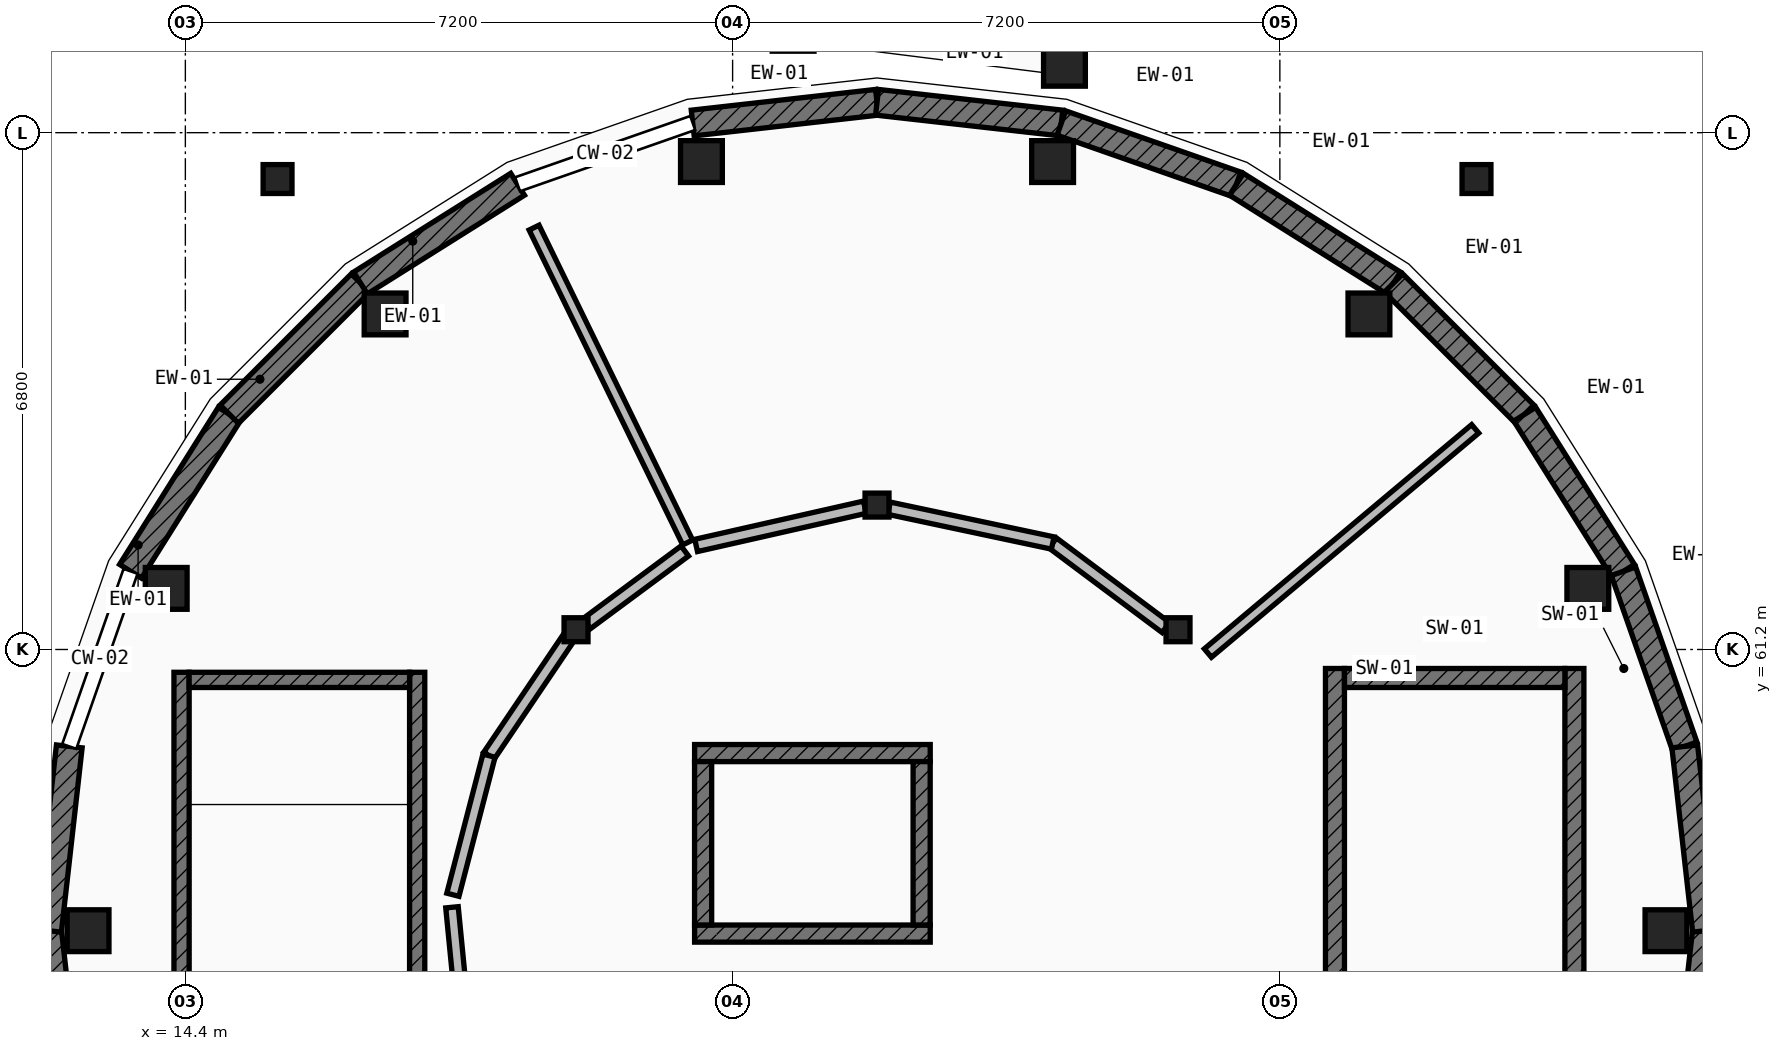
"""IFC4 building model, lengths in metres.
Left out: names, types, materials, properties, quantities, classifications, styles, units other than length and angle.
Written with IfcOpenShell. Run it as: python <this file> out.ifc"""

import sys

from ifc_helpers import new_model, si_unit, direction, frame, frame_2d, origin, origin_2d, place, context, subcontext, project, spatial, rectangle, circle, extrude, element, fill, save


model = new_model("IFC4")
c1 = context("Model", 3, precision=1e-05, world=origin(), true_north=direction((0.0, 1.0)))
c2 = subcontext(c1, "Body", "Model", "MODEL_VIEW")
j1 = project(units=[si_unit("LENGTHUNIT", "METRE"), si_unit("PLANEANGLEUNIT", "RADIAN")], contexts=[c1])
p1 = place(None, origin())
s1 = spatial("IfcSite", under=j1, at=p1, CompositionType="ELEMENT")
p2 = place(p1, origin())
s2 = spatial("IfcBuilding", under=s1, at=p2, CompositionType="ELEMENT")
p3 = place(p2, origin())
s3 = spatial("IfcBuildingStorey", under=s2, at=p3, CompositionType="ELEMENT", Elevation=0.0)
for number, where, z_axis, x_axis in (
    (1, (33.88, 57.5, 0.0), (0.0, 0.0, 1.0), (1.0, 0.0, 0.0)),
    (2, (32.852, 62.004, 0.0), (0.0, 0.0, 1.0), (1.0, 0.0, 0.0)),
    (3, (29.972, 65.615, 0.0), (0.0, 0.0, 1.0), (1.0, 0.0, 0.0)),
    (4, (25.81, 67.62, 0.0), (0.0, 0.0, 1.0), (1.0, 0.0, 0.0)),
    (5, (21.19, 67.62, 0.0), (0.0, 0.0, 1.0), (1.0, 0.0, 0.0)),
    (6, (17.028, 65.615, 0.0), (0.0, 0.0, 1.0), (1.0, 0.0, 0.0)),
    (7, (14.148, 62.004, 0.0), (0.0, 0.0, 1.0), (1.0, 0.0, 0.0)),
    (8, (13.12, 57.5, 0.0), (0.0, 0.0, 1.0), (1.0, 0.0, 0.0)),
):
    element("IfcColumn", number, at=place(p3, frame(where, z_axis=z_axis, x_axis=x_axis)), inside=s3, PredefinedType="PILASTER", context=c2, shape_type="SweptSolid", body=[
        extrude(circle(Radius=0.275, at=origin_2d()), origin(), (0.0, 0.0, 1.0), 4.55),
    ])
for number, where, z_axis, x_axis in (
    (9, (27.46, 61.46, 0.0), (0.0, 0.0, 1.0), (1.0, 0.0, 0.0)),
    (10, (23.5, 63.1, 0.0), (0.0, 0.0, 1.0), (1.0, 0.0, 0.0)),
    (11, (19.54, 61.46, 0.0), (0.0, 0.0, 1.0), (1.0, 0.0, 0.0)),
):
    element("IfcColumn", number, at=place(p3, frame(where, z_axis=z_axis, x_axis=x_axis)), inside=s3, PredefinedType="COLUMN", context=c2, shape_type="SweptSolid", body=[
        extrude(rectangle(XDim=0.315, YDim=0.315, at=origin_2d()), origin(), (0.0, 0.0, 1.0), 4.55),
    ])
p4 = place(p3, frame((25.966, 68.887, 0.0), z_axis=(0.0, 0.0, 1.0), x_axis=(1.0, 0.0, 0.0)))
e12 = element("IfcColumn", 12, at=p4, inside=s3, PredefinedType="PILASTER", context=c2, shape_type="SweptSolid", body=[
    extrude(circle(Radius=0.275, at=origin_2d()), origin(), (0.0, 0.0, 1.0), 4.55),
])
for number, where, z_axis, x_axis in (
    (13, (31.387, 67.39, 1.15), (0.0, 0.0, 1.0), (1.0, 0.0, 0.0)),
    (14, (15.613, 67.39, 1.15), (0.0, 0.0, 1.0), (1.0, 0.0, 0.0)),
):
    element("IfcColumn", number, at=place(p3, frame(where, z_axis=z_axis, x_axis=x_axis)), inside=s3, PredefinedType="PILASTER", context=c2, shape_type="SweptSolid", body=[
        extrude(circle(Radius=0.19, at=origin_2d()), origin(), (0.0, 0.0, 1.0), 3.4),
    ])
for number, where, z_axis, x_axis in (
    (15, (34.4, 57.5, 0.0), (0.0, 0.0, 1.0), (-0.112, -0.994, 0.0)),
    (16, (12.873, 55.075, 0.0), (0.0, 0.0, 1.0), (-0.112, 0.994, 0.0)),
    (17, (12.6, 57.5, 0.0), (0.0, 0.0, 1.0), (0.112, 0.994, 0.0)),
):
    element("IfcWall", number, at=place(p3, frame(where, z_axis=z_axis, x_axis=x_axis)), inside=s3, PredefinedType="SOLIDWALL", context=c2, shape_type="SweptSolid", body=[
        extrude(rectangle(XDim=2.44, YDim=0.34, at=frame_2d((1.22, 0.0))), origin(), (0.0, 0.0, 1.0), 3.659),
    ])
p5 = place(p3, frame((13.679, 62.229, 0.0), z_axis=(0.0, 0.0, 1.0), x_axis=(0.532136726684, 0.846658434148, 0.0)))
e18 = element("IfcWall", 18, at=p5, inside=s3, PredefinedType="SOLIDWALL", context=c2, shape_type="SweptSolid", body=[
    extrude(rectangle(XDim=2.441, YDim=0.34, at=frame_2d((1.221, 0.0))), origin(), (0.0, 0.0, 1.0), 3.659),
])
p6 = place(p5, frame((0.521, 0.0, 0.0)))
e19 = element("IfcOpeningElement", 19, at=p6, cuts=e18, PredefinedType="OPENING", context=c2, shape_type="SweptSolid", body=[
    extrude(rectangle(XDim=1.4, YDim=2.3, at=frame_2d((0.7, 1.15))), frame((0.0, 0.18, 0.0), z_axis=(0.0, -1.0, 0.0), x_axis=(1.0, 0.0, 0.0)), (0.0, 0.0, 1.0), 0.36),
])
p7 = place(p3, frame((14.978, 64.296, 0.0), z_axis=(0.0, 0.0, 1.0), x_axis=(0.707106781187, 0.707106781187, 0.0)))
e20 = element("IfcWall", 20, at=p7, inside=s3, PredefinedType="SOLIDWALL", context=c2, shape_type="SweptSolid", body=[
    extrude(rectangle(XDim=2.441, YDim=0.34, at=frame_2d((1.22, 0.0))), origin(), (0.0, 0.0, 1.0), 3.659),
])
p8 = place(p3, frame((16.704, 66.022, 0.0), z_axis=(0.0, 0.0, 1.0), x_axis=(0.846658434148, 0.532136726684, 0.0)))
e21 = element("IfcWall", 21, at=p8, inside=s3, PredefinedType="SOLIDWALL", context=c2, shape_type="SweptSolid", body=[
    extrude(rectangle(XDim=2.441, YDim=0.34, at=frame_2d((1.221, 0.0))), origin(), (0.0, 0.0, 1.0), 3.659),
])
for number, where, z_axis, x_axis in (
    (22, (21.075, 68.127, 0.0), (0.0, 0.0, 1.0), (0.994, 0.112, 0.0)),
    (23, (23.5, 68.4, 0.0), (0.0, 0.0, 1.0), (0.994, -0.112, 0.0)),
):
    element("IfcWall", number, at=place(p3, frame(where, z_axis=z_axis, x_axis=x_axis)), inside=s3, PredefinedType="SOLIDWALL", context=c2, shape_type="SweptSolid", body=[
        extrude(rectangle(XDim=2.44, YDim=0.34, at=frame_2d((1.22, 0.0))), origin(), (0.0, 0.0, 1.0), 3.659),
    ])
p9 = place(p3, frame((25.925, 68.127, 0.0), z_axis=(0.0, 0.0, 1.0), x_axis=(0.943919156274, -0.330176659411, 0.0)))
e24 = element("IfcWall", 24, at=p9, inside=s3, PredefinedType="SOLIDWALL", context=c2, shape_type="SweptSolid", body=[
    extrude(rectangle(XDim=2.441, YDim=0.34, at=frame_2d((1.22, 0.0))), origin(), (0.0, 0.0, 1.0), 3.659),
])
p10 = place(p3, frame((28.229, 67.321, 0.0), z_axis=(0.0, 0.0, 1.0), x_axis=(0.846658434148, -0.532136726684, 0.0)))
e25 = element("IfcWall", 25, at=p10, inside=s3, PredefinedType="SOLIDWALL", context=c2, shape_type="SweptSolid", body=[
    extrude(rectangle(XDim=2.441, YDim=0.34, at=frame_2d((1.221, 0.0))), origin(), (0.0, 0.0, 1.0), 3.659),
])
p11 = place(p10, frame((0.571, 0.0, 0.0)))
e26 = element("IfcOpeningElement", 26, at=p11, cuts=e25, PredefinedType="OPENING", context=c2, shape_type="SweptSolid", body=[
    extrude(rectangle(XDim=1.3, YDim=2.25, at=frame_2d((0.65, 1.125))), frame((0.0, 0.18, 0.0), z_axis=(0.0, -1.0, 0.0), x_axis=(1.0, 0.0, 0.0)), (0.0, 0.0, 1.0), 0.36),
])
p12 = place(p3, frame((30.296, 66.022, 0.0), z_axis=(0.0, 0.0, 1.0), x_axis=(0.707106781187, -0.707106781187, 0.0)))
e27 = element("IfcWall", 27, at=p12, inside=s3, PredefinedType="SOLIDWALL", context=c2, shape_type="SweptSolid", body=[
    extrude(rectangle(XDim=2.441, YDim=0.34, at=frame_2d((1.22, 0.0))), origin(), (0.0, 0.0, 1.0), 3.659),
])
p13 = place(p3, frame((32.022, 64.296, 0.0), z_axis=(0.0, 0.0, 1.0), x_axis=(0.532136726684, -0.846658434148, 0.0)))
e28 = element("IfcWall", 28, at=p13, inside=s3, PredefinedType="SOLIDWALL", context=c2, shape_type="SweptSolid", body=[
    extrude(rectangle(XDim=2.441, YDim=0.34, at=frame_2d((1.221, 0.0))), origin(), (0.0, 0.0, 1.0), 3.659),
])
p14 = place(p3, frame((33.321, 62.229, 0.0), z_axis=(0.0, 0.0, 1.0), x_axis=(0.330176659411, -0.943919156274, 0.0)))
e29 = element("IfcWall", 29, at=p14, inside=s3, PredefinedType="SOLIDWALL", context=c2, shape_type="SweptSolid", body=[
    extrude(rectangle(XDim=2.441, YDim=0.34, at=frame_2d((1.22, 0.0))), origin(), (0.0, 0.0, 1.0), 3.659),
])
p15 = place(p3, frame((34.127, 59.925, 0.0), z_axis=(0.0, 0.0, 1.0), x_axis=(0.111847873866, -0.993725340882, 0.0)))
e30 = element("IfcWall", 30, at=p15, inside=s3, PredefinedType="SOLIDWALL", context=c2, shape_type="SweptSolid", body=[
    extrude(rectangle(XDim=2.44, YDim=0.34, at=frame_2d((1.22, 0.0))), origin(), (0.0, 0.0, 1.0), 3.659),
])
p16 = place(p3, frame((29.525, 60.95, 0.0), z_axis=(0.0, 0.0, 1.0), x_axis=(0.0, -1.0, 0.0)))
e31 = element("IfcWall", 31, at=p16, inside=s3, PredefinedType="SHEAR", context=c2, shape_type="SweptSolid", body=[
    extrude(rectangle(XDim=6.9, YDim=0.25, at=frame_2d((3.45, 0.0))), origin(), (0.0, 0.0, 1.0), 4.305),
])
p17 = place(p16, frame((0.43, 0.0, 0.0)))
e32 = element("IfcOpeningElement", 32, at=p17, cuts=e31, PredefinedType="OPENING", context=c2, shape_type="SweptSolid", body=[
    extrude(rectangle(XDim=1.1, YDim=2.15, at=frame_2d((0.55, 1.075))), frame((0.0, 0.135, 0.0), z_axis=(0.0, -1.0, 0.0), x_axis=(1.0, 0.0, 0.0)), (0.0, 0.0, 1.0), 0.27),
])
p18 = place(p3, frame((32.675, 60.95, 0.0), z_axis=(0.0, 0.0, 1.0), x_axis=(0.0, -1.0, 0.0)))
e33 = element("IfcWall", 33, at=p18, inside=s3, PredefinedType="SHEAR", context=c2, shape_type="SweptSolid", body=[
    extrude(rectangle(XDim=6.9, YDim=0.25, at=frame_2d((3.45, 0.0))), origin(), (0.0, 0.0, 1.0), 4.305),
])
p19 = place(p3, frame((29.65, 60.825, 0.0), z_axis=(0.0, 0.0, 1.0), x_axis=(1.0, 0.0, 0.0)))
e34 = element("IfcWall", 34, at=p19, inside=s3, PredefinedType="SHEAR", context=c2, shape_type="SweptSolid", body=[
    extrude(rectangle(XDim=2.9, YDim=0.25, at=frame_2d((1.45, 0.0))), origin(), (0.0, 0.0, 1.0), 4.305),
])
p20 = place(p3, frame((17.45, 54.1, 0.0), z_axis=(0.0, 0.0, 1.0), x_axis=(0.0, 1.0, 0.0)))
e35 = element("IfcWall", 35, at=p20, inside=s3, PredefinedType="SHEAR", context=c2, shape_type="SweptSolid", body=[
    extrude(rectangle(XDim=6.8, YDim=0.2, at=frame_2d((3.4, 0.0))), origin(), (0.0, 0.0, 1.0), 4.305),
])
p21 = place(p20, frame((0.38, 0.0, 0.0)))
e36 = element("IfcOpeningElement", 36, at=p21, cuts=e35, PredefinedType="OPENING", context=c2, shape_type="SweptSolid", body=[
    extrude(rectangle(XDim=1.05, YDim=2.15, at=frame_2d((0.525, 1.075))), frame((0.0, 0.11, 0.0), z_axis=(0.0, -1.0, 0.0), x_axis=(1.0, 0.0, 0.0)), (0.0, 0.0, 1.0), 0.22),
])
p22 = place(p3, frame((14.35, 54.1, 0.0), z_axis=(0.0, 0.0, 1.0), x_axis=(0.0, 1.0, 0.0)))
e37 = element("IfcWall", 37, at=p22, inside=s3, PredefinedType="SHEAR", context=c2, shape_type="SweptSolid", body=[
    extrude(rectangle(XDim=6.8, YDim=0.2, at=frame_2d((3.4, 0.0))), origin(), (0.0, 0.0, 1.0), 4.305),
])
p23 = place(p3, frame((17.35, 60.8, 0.0), z_axis=(0.0, 0.0, 1.0), x_axis=(-1.0, 0.0, 0.0)))
e38 = element("IfcWall", 38, at=p23, inside=s3, PredefinedType="SHEAR", context=c2, shape_type="SweptSolid", body=[
    extrude(rectangle(XDim=2.9, YDim=0.2, at=frame_2d((1.45, 0.0))), origin(), (0.0, 0.0, 1.0), 4.305),
])
p24 = place(p3, frame((21.1, 57.462, 0.0), z_axis=(0.0, 0.0, 1.0), x_axis=(1.0, 0.0, 0.0)))
e39 = element("IfcWall", 39, at=p24, inside=s3, PredefinedType="SHEAR", context=c2, shape_type="SweptSolid", body=[
    extrude(rectangle(XDim=3.1, YDim=0.225, at=frame_2d((1.55, 0.0))), origin(), (0.0, 0.0, 1.0), 4.305),
])
p25 = place(p24, frame((0.95, 0.0, 0.0)))
e40 = element("IfcOpeningElement", 40, at=p25, cuts=e39, PredefinedType="OPENING", context=c2, shape_type="SweptSolid", body=[
    extrude(rectangle(XDim=1.2, YDim=2.2, at=frame_2d((0.6, 1.1))), frame((0.0, 0.123, 0.0), z_axis=(0.0, -1.0, 0.0), x_axis=(1.0, 0.0, 0.0)), (0.0, 0.0, 1.0), 0.245),
])
p26 = place(p3, frame((21.1, 59.837, 0.0), z_axis=(0.0, 0.0, 1.0), x_axis=(1.0, 0.0, 0.0)))
e41 = element("IfcWall", 41, at=p26, inside=s3, PredefinedType="SHEAR", context=c2, shape_type="SweptSolid", body=[
    extrude(rectangle(XDim=3.1, YDim=0.225, at=frame_2d((1.55, 0.0))), origin(), (0.0, 0.0, 1.0), 4.305),
])
for number, where, z_axis, x_axis in (
    (42, (21.212, 57.575, 0.0), (0.0, 0.0, 1.0), (0.0, 1.0, 0.0)),
    (43, (24.087, 57.575, 0.0), (0.0, 0.0, 1.0), (0.0, 1.0, 0.0)),
):
    element("IfcWall", number, at=place(p3, frame(where, z_axis=z_axis, x_axis=x_axis)), inside=s3, PredefinedType="SHEAR", context=c2, shape_type="SweptSolid", body=[
        extrude(rectangle(XDim=2.15, YDim=0.225, at=frame_2d((1.075, 0.0))), origin(), (0.0, 0.0, 1.0), 4.305),
    ])
p27 = place(p3, frame((27.853, 61.153, 0.0), z_axis=(0.0, 0.0, 1.0), x_axis=(0.766177182771, 0.64262938355, 0.0)))
e44 = element("IfcWall", 44, at=p27, inside=s3, PredefinedType="PARTITIONING", context=c2, shape_type="SweptSolid", body=[
    extrude(rectangle(XDim=4.59, YDim=0.145, at=frame_2d((2.295, 0.0))), origin(), (0.0, 0.0, 1.0), 3.634),
])
p28 = place(p3, frame((21.009, 62.608, 0.0), z_axis=(0.0, 0.0, 1.0), x_axis=(-0.438421545089, 0.898769463657, 0.0)))
e45 = element("IfcWall", 45, at=p28, inside=s3, PredefinedType="PARTITIONING", context=c2, shape_type="SweptSolid", body=[
    extrude(rectangle(XDim=4.61, YDim=0.145, at=frame_2d((2.305, 0.0))), origin(), (0.0, 0.0, 1.0), 3.634),
])
p29 = place(p3, frame((27.3, 61.489, 0.0), z_axis=(0.0, 0.0, 1.0), x_axis=(-0.801023932766, 0.598632323831, 0.0)))
e46 = element("IfcWall", 46, at=p29, inside=s3, PredefinedType="PARTITIONING", context=c2, shape_type="SweptSolid", body=[
    extrude(rectangle(XDim=1.858, YDim=0.165, at=frame_2d((0.929, 0.0))), origin(), (0.0, 0.0, 1.0), 3.634),
])
p30 = place(p29, frame((0.289, 0.0, 0.0)))
e47 = element("IfcOpeningElement", 47, at=p30, cuts=e46, PredefinedType="OPENING", context=c2, shape_type="SweptSolid", body=[
    extrude(rectangle(XDim=1.28, YDim=2.3, at=frame_2d((0.64, 1.15))), frame((0.0, 0.093, 0.0), z_axis=(0.0, -1.0, 0.0), x_axis=(1.0, 0.0, 0.0)), (0.0, 0.0, 1.0), 0.185),
])
p31 = place(p3, frame((25.812, 62.601, 0.0), z_axis=(0.0, 0.0, 1.0), x_axis=(-0.978152936259, 0.207886587563, 0.0)))
e48 = element("IfcWall", 48, at=p31, inside=s3, PredefinedType="PARTITIONING", context=c2, shape_type="SweptSolid", body=[
    extrude(rectangle(XDim=2.203, YDim=0.165, at=frame_2d((1.102, 0.0))), origin(), (0.0, 0.0, 1.0), 3.634),
])
p32 = place(p3, frame((23.34, 63.072, 0.0), z_axis=(0.0, 0.0, 1.0), x_axis=(-0.975285396453, -0.2209488526, 0.0)))
e49 = element("IfcWall", 49, at=p32, inside=s3, PredefinedType="PARTITIONING", context=c2, shape_type="SweptSolid", body=[
    extrude(rectangle(XDim=2.276, YDim=0.165, at=frame_2d((1.138, 0.0))), origin(), (0.0, 0.0, 1.0), 3.634),
])
p33 = place(p3, frame((20.971, 62.496, 0.0), z_axis=(0.0, 0.0, 1.0), x_axis=(-0.803417109956, -0.59541661669, 0.0)))
e50 = element("IfcWall", 50, at=p33, inside=s3, PredefinedType="PARTITIONING", context=c2, shape_type="SweptSolid", body=[
    extrude(rectangle(XDim=1.606, YDim=0.165, at=frame_2d((0.803, 0.0))), origin(), (0.0, 0.0, 1.0), 3.634),
])
p34 = place(p33, frame((0.353, 0.0, 0.0)))
e51 = element("IfcOpeningElement", 51, at=p34, cuts=e50, PredefinedType="OPENING", context=c2, shape_type="SweptSolid", body=[
    extrude(rectangle(XDim=0.9, YDim=2.1, at=frame_2d((0.45, 1.05))), frame((0.0, 0.093, 0.0), z_axis=(0.0, -1.0, 0.0), x_axis=(1.0, 0.0, 0.0)), (0.0, 0.0, 1.0), 0.185),
])
p35 = place(p3, frame((19.432, 61.339, 0.0), z_axis=(0.0, 0.0, 1.0), x_axis=(-0.559463805142, -0.828854782659, 0.0)))
e52 = element("IfcWall", 52, at=p35, inside=s3, PredefinedType="PARTITIONING", context=c2, shape_type="SweptSolid", body=[
    extrude(rectangle(XDim=1.853, YDim=0.165, at=frame_2d((0.927, 0.0))), origin(), (0.0, 0.0, 1.0), 3.634),
])
p36 = place(p3, frame((18.395, 59.803, 0.0), z_axis=(0.0, 0.0, 1.0), x_axis=(-0.251275827958, -0.967915522287, 0.0)))
e53 = element("IfcWall", 53, at=p36, inside=s3, PredefinedType="PARTITIONING", context=c2, shape_type="SweptSolid", body=[
    extrude(rectangle(XDim=1.891, YDim=0.165, at=frame_2d((0.945, 0.0))), origin(), (0.0, 0.0, 1.0), 3.634),
])
p37 = place(p3, frame((17.908, 57.808, 0.0), z_axis=(0.0, 0.0, 1.0), x_axis=(0.097655572539, -0.995220271675, 0.0)))
e54 = element("IfcWall", 54, at=p37, inside=s3, PredefinedType="PARTITIONING", context=c2, shape_type="SweptSolid", body=[
    extrude(rectangle(XDim=1.465, YDim=0.165, at=frame_2d((0.732, 0.0))), origin(), (0.0, 0.0, 1.0), 3.634),
])
p38 = place(p6, origin())
e55 = element("IfcDoor", 55, at=p38, inside=s3, OperationType="SINGLE_SWING_LEFT", PredefinedType="DOOR", context=c2, shape_type="SweptSolid", body=[
    extrude(rectangle(XDim=1.4, YDim=2.3, at=frame_2d((0.7, 1.15))), frame((0.0, 0.025, 0.0), z_axis=(0.0, -1.0, 0.0), x_axis=(1.0, 0.0, 0.0)), (0.0, 0.0, 1.0), 0.05),
])
fill(e19, e55)
p39 = place(p11, origin())
e56 = element("IfcDoor", 56, at=p39, inside=s3, OperationType="SINGLE_SWING_RIGHT", PredefinedType="DOOR", context=c2, shape_type="SweptSolid", body=[
    extrude(rectangle(XDim=1.3, YDim=2.25, at=frame_2d((0.65, 1.125))), frame((0.0, 0.025, 0.0), z_axis=(0.0, -1.0, 0.0), x_axis=(1.0, 0.0, 0.0)), (0.0, 0.0, 1.0), 0.05),
])
fill(e26, e56)
p40 = place(p17, origin())
e57 = element("IfcDoor", 57, at=p40, inside=s3, OperationType="SINGLE_SWING_RIGHT", PredefinedType="DOOR", context=c2, shape_type="SweptSolid", body=[
    extrude(rectangle(XDim=1.1, YDim=2.15, at=frame_2d((0.55, 1.075))), frame((0.0, 0.025, 0.0), z_axis=(0.0, -1.0, 0.0), x_axis=(1.0, 0.0, 0.0)), (0.0, 0.0, 1.0), 0.05),
])
fill(e32, e57)
p41 = place(p25, origin())
e58 = element("IfcDoor", 58, at=p41, inside=s3, OperationType="DOUBLE_DOOR_SLIDING", PredefinedType="DOOR", context=c2, shape_type="SweptSolid", body=[
    extrude(rectangle(XDim=1.2, YDim=2.2, at=frame_2d((0.6, 1.1))), frame((0.0, 0.025, 0.0), z_axis=(0.0, -1.0, 0.0), x_axis=(1.0, 0.0, 0.0)), (0.0, 0.0, 1.0), 0.05),
])
fill(e40, e58)
p42 = place(p30, origin())
e59 = element("IfcDoor", 59, at=p42, inside=s3, OperationType="SINGLE_SWING_LEFT", PredefinedType="DOOR", context=c2, shape_type="SweptSolid", body=[
    extrude(rectangle(XDim=1.28, YDim=2.3, at=frame_2d((0.64, 1.15))), frame((0.0, 0.025, 0.0), z_axis=(0.0, -1.0, 0.0), x_axis=(1.0, 0.0, 0.0)), (0.0, 0.0, 1.0), 0.05),
])
fill(e47, e59)
p43 = place(p34, origin())
e60 = element("IfcDoor", 60, at=p43, inside=s3, OperationType="SINGLE_SWING_RIGHT", PredefinedType="DOOR", context=c2, shape_type="SweptSolid", body=[
    extrude(rectangle(XDim=0.9, YDim=2.1, at=frame_2d((0.45, 1.05))), frame((0.0, 0.025, 0.0), z_axis=(0.0, -1.0, 0.0), x_axis=(1.0, 0.0, 0.0)), (0.0, 0.0, 1.0), 0.05),
])
fill(e51, e60)
save(model, sys.argv[1])
